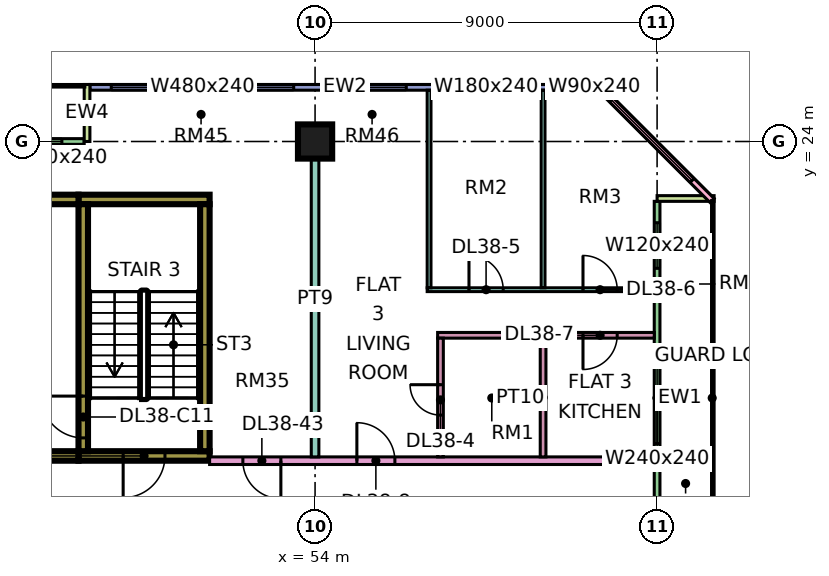
"""IFC4 building model, lengths in metres.
Left out: names, types, materials, properties, quantities, classifications, styles, units other than length and angle.
Written with IfcOpenShell. Run it as: python <this file> out.ifc"""

import sys

from ifc_helpers import new_model, si_unit, direction, frame, frame_2d, origin, origin_2d, place, context, subcontext, project, spatial, rectangle, extrude, element, fill, save


model = new_model("IFC4")
c1 = context("Model", 3, precision=1e-05, world=origin(), true_north=direction((0.0, 1.0)))
c2 = subcontext(c1, "Body", "Model", "MODEL_VIEW")
j1 = project(units=[si_unit("LENGTHUNIT", "METRE"), si_unit("PLANEANGLEUNIT", "RADIAN")], contexts=[c1])
p1 = place(None, origin())
s1 = spatial("IfcSite", under=j1, at=p1, CompositionType="ELEMENT")
p2 = place(p1, origin())
s2 = spatial("IfcBuilding", under=s1, at=p2, CompositionType="ELEMENT")
p3 = place(p2, frame((0.0, 0.0, 168.65)))
s3 = spatial("IfcBuildingStorey", under=s2, at=p3, CompositionType="ELEMENT", Elevation=168.65)
p4 = place(p3, frame((54.0, 24.0, 0.0), z_axis=(0.0, 0.0, 1.0), x_axis=(1.0, 0.0, 0.0)))
e1 = element("IfcColumn", 1, at=p4, inside=s3, PredefinedType="COLUMN", context=c2, shape_type="SweptSolid", body=[
    extrude(rectangle(XDim=0.9, YDim=0.9, at=origin_2d()), origin(), (0.0, 0.0, 1.0), 3.75),
])
p5 = place(p3, frame((47.775, 15.725, 0.0), z_axis=(0.0, 0.0, 1.0), x_axis=(1.0, 0.0, 0.0)))
e2 = element("IfcWall", 2, at=p5, inside=s3, PredefinedType="SHEAR", context=c2, shape_type="SweptSolid", body=[
    extrude(rectangle(XDim=3.45, YDim=0.25, at=frame_2d((1.725, 0.0))), origin(), (0.0, 0.0, 1.0), 3.75),
])
p6 = place(p5, frame((1.175, 0.0, 0.0)))
e3 = element("IfcOpeningElement", 3, at=p6, cuts=e2, PredefinedType="OPENING", context=c2, shape_type="SweptSolid", body=[
    extrude(rectangle(XDim=1.1, YDim=2.2, at=frame_2d((0.55, 1.1))), frame((0.0, 0.135, 0.0), z_axis=(0.0, -1.0, 0.0), x_axis=(1.0, 0.0, 0.0)), (0.0, 0.0, 1.0), 0.27),
])
p7 = place(p3, frame((47.775, 22.475, 0.0), z_axis=(0.0, 0.0, 1.0), x_axis=(1.0, 0.0, 0.0)))
e4 = element("IfcWall", 4, at=p7, inside=s3, PredefinedType="SHEAR", context=c2, shape_type="SweptSolid", body=[
    extrude(rectangle(XDim=3.45, YDim=0.25, at=frame_2d((1.725, 0.0))), origin(), (0.0, 0.0, 1.0), 3.75),
])
p8 = place(p3, frame((47.9, 15.85, 0.0), z_axis=(0.0, 0.0, 1.0), x_axis=(0.0, 1.0, 0.0)))
e5 = element("IfcWall", 5, at=p8, inside=s3, PredefinedType="SHEAR", context=c2, shape_type="SweptSolid", body=[
    extrude(rectangle(XDim=6.5, YDim=0.25, at=frame_2d((3.25, 0.0))), origin(), (0.0, 0.0, 1.0), 3.75),
])
p9 = place(p8, frame((0.35, 0.0, 0.0)))
e6 = element("IfcOpeningElement", 6, at=p9, cuts=e5, PredefinedType="OPENING", context=c2, shape_type="SweptSolid", body=[
    extrude(rectangle(XDim=1.1, YDim=2.2, at=frame_2d((0.55, 1.1))), frame((0.0, 0.135, 0.0), z_axis=(0.0, -1.0, 0.0), x_axis=(1.0, 0.0, 0.0)), (0.0, 0.0, 1.0), 0.27),
])
p10 = place(p3, frame((51.1, 15.85, 0.0), z_axis=(0.0, 0.0, 1.0), x_axis=(0.0, 1.0, 0.0)))
e7 = element("IfcWall", 7, at=p10, inside=s3, PredefinedType="SHEAR", context=c2, shape_type="SweptSolid", body=[
    extrude(rectangle(XDim=6.5, YDim=0.25, at=frame_2d((3.25, 0.0))), origin(), (0.0, 0.0, 1.0), 3.75),
])
p11 = place(p3, frame((44.35, 15.725, 0.0), z_axis=(0.0, 0.0, 1.0), x_axis=(1.0, 0.0, 0.0)))
e8 = element("IfcWall", 8, at=p11, inside=s3, PredefinedType="SHEAR", context=c2, shape_type="SweptSolid", body=[
    extrude(rectangle(XDim=3.425, YDim=0.25, at=frame_2d((1.712, 0.0))), origin(), (0.0, 0.0, 1.0), 3.75),
])
p12 = place(p11, frame((1.25, 0.0, 0.0)))
e9 = element("IfcOpeningElement", 9, at=p12, cuts=e8, PredefinedType="OPENING", context=c2, shape_type="SweptSolid", body=[
    extrude(rectangle(XDim=1.2, YDim=2.2, at=frame_2d((0.6, 1.1))), frame((0.0, 0.135, 0.0), z_axis=(0.0, -1.0, 0.0), x_axis=(1.0, 0.0, 0.0)), (0.0, 0.0, 1.0), 0.27),
])
p13 = place(p3, frame((44.35, 22.475, 0.0), z_axis=(0.0, 0.0, 1.0), x_axis=(1.0, 0.0, 0.0)))
e10 = element("IfcWall", 10, at=p13, inside=s3, PredefinedType="SHEAR", context=c2, shape_type="SweptSolid", body=[
    extrude(rectangle(XDim=3.425, YDim=0.25, at=frame_2d((1.712, 0.0))), origin(), (0.0, 0.0, 1.0), 3.75),
])
p14 = place(p3, frame((61.5, 25.425, 0.0), z_axis=(0.0, 0.0, 1.0), x_axis=(-1.0, 0.0, 0.0)))
e11 = element("IfcWall", 11, at=p14, inside=s3, PredefinedType="SOLIDWALL", context=c2, shape_type="SweptSolid", body=[
    extrude(rectangle(XDim=13.425, YDim=0.15, at=frame_2d((6.712, 0.0))), origin(), (0.0, 0.0, 1.0), 3.35),
])
p15 = place(p14, frame((0.3, 0.0, 0.45)))
e12 = element("IfcOpeningElement", 12, at=p15, cuts=e11, PredefinedType="OPENING", context=c2, shape_type="SweptSolid", body=[
    extrude(rectangle(XDim=0.9, YDim=2.4, at=frame_2d((0.45, 1.2))), frame((0.0, 0.085, 0.0), z_axis=(0.0, -1.0, 0.0), x_axis=(1.0, 0.0, 0.0)), (0.0, 0.0, 1.0), 0.17),
])
p16 = place(p14, frame((2.1, 0.0, 0.45)))
e13 = element("IfcOpeningElement", 13, at=p16, cuts=e11, PredefinedType="OPENING", context=c2, shape_type="SweptSolid", body=[
    extrude(rectangle(XDim=1.8, YDim=2.4, at=frame_2d((0.9, 1.2))), frame((0.0, 0.085, 0.0), z_axis=(0.0, -1.0, 0.0), x_axis=(1.0, 0.0, 0.0)), (0.0, 0.0, 1.0), 0.17),
])
p17 = place(p14, frame((5.1, 0.0, 0.45)))
e14 = element("IfcOpeningElement", 14, at=p17, cuts=e11, PredefinedType="OPENING", context=c2, shape_type="SweptSolid", body=[
    extrude(rectangle(XDim=1.8, YDim=2.4, at=frame_2d((0.9, 1.2))), frame((0.0, 0.085, 0.0), z_axis=(0.0, -1.0, 0.0), x_axis=(1.0, 0.0, 0.0)), (0.0, 0.0, 1.0), 0.17),
])
p18 = place(p14, frame((8.062, 0.0, 0.45)))
e15 = element("IfcOpeningElement", 15, at=p18, cuts=e11, PredefinedType="OPENING", context=c2, shape_type="SweptSolid", body=[
    extrude(rectangle(XDim=4.8, YDim=2.4, at=frame_2d((2.4, 1.2))), frame((0.0, 0.085, 0.0), z_axis=(0.0, -1.0, 0.0), x_axis=(1.0, 0.0, 0.0)), (0.0, 0.0, 1.0), 0.17),
])
p19 = place(p3, frame((47.925, 24.0, 0.0), z_axis=(0.0, 0.0, 1.0), x_axis=(-1.0, 0.0, 0.0)))
e16 = element("IfcWall", 16, at=p19, inside=s3, PredefinedType="SOLIDWALL", context=c2, shape_type="SweptSolid", body=[
    extrude(rectangle(XDim=7.35, YDim=0.15, at=frame_2d((3.675, 0.0))), origin(), (0.0, 0.0, 1.0), 3.35),
])
p20 = place(p19, frame((0.587, 0.0, 0.45)))
e17 = element("IfcOpeningElement", 17, at=p20, cuts=e16, PredefinedType="OPENING", context=c2, shape_type="SweptSolid", body=[
    extrude(rectangle(XDim=1.2, YDim=2.4, at=frame_2d((0.6, 1.2))), frame((0.0, 0.085, 0.0), z_axis=(0.0, -1.0, 0.0), x_axis=(1.0, 0.0, 0.0)), (0.0, 0.0, 1.0), 0.17),
])
p21 = place(p19, frame((3.913, 0.0, 0.45)))
e18 = element("IfcOpeningElement", 18, at=p21, cuts=e16, PredefinedType="OPENING", context=c2, shape_type="SweptSolid", body=[
    extrude(rectangle(XDim=3.0, YDim=2.4, at=frame_2d((1.5, 1.2))), frame((0.0, 0.085, 0.0), z_axis=(0.0, -1.0, 0.0), x_axis=(1.0, 0.0, 0.0)), (0.0, 0.0, 1.0), 0.17),
])
p22 = place(p3, frame((48.0, 25.5, 0.0), z_axis=(0.0, 0.0, 1.0), x_axis=(0.0, -1.0, 0.0)))
e19 = element("IfcWall", 19, at=p22, inside=s3, PredefinedType="SOLIDWALL", context=c2, shape_type="SweptSolid", body=[
    extrude(rectangle(XDim=1.5, YDim=0.15, at=frame_2d((0.75, 0.0))), origin(), (0.0, 0.0, 1.0), 3.35),
])
p23 = place(p3, frame((63.0, 12.075, 0.0), z_axis=(0.0, 0.0, 1.0), x_axis=(0.0, 1.0, 0.0)))
e20 = element("IfcWall", 20, at=p23, inside=s3, PredefinedType="SOLIDWALL", context=c2, shape_type="SweptSolid", body=[
    extrude(rectangle(XDim=10.35, YDim=0.15, at=frame_2d((5.175, 0.0))), origin(), (0.0, 0.0, 1.0), 3.35),
])
p24 = place(p23, frame((3.975, 0.0, 0.45)))
e21 = element("IfcOpeningElement", 21, at=p24, cuts=e20, PredefinedType="OPENING", context=c2, shape_type="SweptSolid", body=[
    extrude(rectangle(XDim=2.4, YDim=2.4, at=frame_2d((1.2, 1.2))), frame((0.0, 0.085, 0.0), z_axis=(0.0, -1.0, 0.0), x_axis=(1.0, 0.0, 0.0)), (0.0, 0.0, 1.0), 0.17),
])
p25 = place(p23, frame((8.587, 0.0, 0.45)))
e22 = element("IfcOpeningElement", 22, at=p25, cuts=e20, PredefinedType="OPENING", context=c2, shape_type="SweptSolid", body=[
    extrude(rectangle(XDim=1.2, YDim=2.4, at=frame_2d((0.6, 1.2))), frame((0.0, 0.085, 0.0), z_axis=(0.0, -1.0, 0.0), x_axis=(1.0, 0.0, 0.0)), (0.0, 0.0, 1.0), 0.17),
])
p26 = place(p3, frame((64.5, 22.5, 0.0), z_axis=(0.0, 0.0, 1.0), x_axis=(-1.0, 0.0, 0.0)))
e23 = element("IfcWall", 23, at=p26, inside=s3, PredefinedType="SOLIDWALL", context=c2, shape_type="SweptSolid", body=[
    extrude(rectangle(XDim=1.5, YDim=0.15, at=frame_2d((0.75, 0.0))), origin(), (0.0, 0.0, 1.0), 3.35),
])
p27 = place(p3, frame((64.447, 22.447, 0.0), z_axis=(0.0, 0.0, 1.0), x_axis=(-0.707106781187, 0.707106781187, 0.0)))
e24 = element("IfcWall", 24, at=p27, inside=s3, PredefinedType="SOLIDWALL", context=c2, shape_type="SweptSolid", body=[
    extrude(rectangle(XDim=4.243, YDim=0.15, at=frame_2d((2.121, 0.0))), origin(), (0.0, 0.0, 1.0), 3.35),
])
p28 = place(p27, frame((0.744, 0.0, 0.45)))
e25 = element("IfcOpeningElement", 25, at=p28, cuts=e24, PredefinedType="OPENING", context=c2, shape_type="SweptSolid", body=[
    extrude(rectangle(XDim=3.0, YDim=2.4, at=frame_2d((1.5, 1.2))), frame((0.0, 0.085, 0.0), z_axis=(0.0, -1.0, 0.0), x_axis=(1.0, 0.0, 0.0)), (0.0, 0.0, 1.0), 0.17),
])
p29 = place(p3, frame((51.225, 15.6, 0.0), z_axis=(0.0, 0.0, 1.0), x_axis=(1.0, 0.0, 0.0)))
e26 = element("IfcWall", 26, at=p29, inside=s3, PredefinedType="PARTITIONING", context=c2, shape_type="SweptSolid", body=[
    extrude(rectangle(XDim=11.701, YDim=0.2, at=frame_2d((5.851, 0.0))), origin(), (0.0, 0.0, 1.0), 3.35),
])
p30 = place(p29, frame((3.875, 0.0, 0.0)))
e27 = element("IfcOpeningElement", 27, at=p30, cuts=e26, PredefinedType="OPENING", context=c2, shape_type="SweptSolid", body=[
    extrude(rectangle(XDim=1.0, YDim=2.1, at=frame_2d((0.5, 1.05))), frame((0.0, 0.11, 0.0), z_axis=(0.0, -1.0, 0.0), x_axis=(1.0, 0.0, 0.0)), (0.0, 0.0, 1.0), 0.22),
])
p31 = place(p29, frame((0.875, 0.0, 0.0)))
e28 = element("IfcOpeningElement", 28, at=p31, cuts=e26, PredefinedType="OPENING", context=c2, shape_type="SweptSolid", body=[
    extrude(rectangle(XDim=1.0, YDim=2.1, at=frame_2d((0.5, 1.05))), frame((0.0, 0.11, 0.0), z_axis=(0.0, -1.0, 0.0), x_axis=(1.0, 0.0, 0.0)), (0.0, 0.0, 1.0), 0.22),
])
p32 = place(p3, frame((54.0, 15.7, 0.0), z_axis=(0.0, 0.0, 1.0), x_axis=(0.0, 1.0, 0.0)))
e29 = element("IfcWall", 29, at=p32, inside=s3, PredefinedType="PARTITIONING", context=c2, shape_type="SweptSolid", body=[
    extrude(rectangle(XDim=8.3, YDim=0.2, at=frame_2d((4.15, 0.0))), origin(), (0.0, 0.0, 1.0), 3.35),
])
p33 = place(p3, frame((56.95, 20.1, 0.0), z_axis=(0.0, 0.0, 1.0), x_axis=(1.0, 0.0, 0.0)))
e30 = element("IfcWall", 30, at=p33, inside=s3, PredefinedType="PARTITIONING", context=c2, shape_type="SweptSolid", body=[
    extrude(rectangle(XDim=5.976, YDim=0.1, at=frame_2d((2.988, 0.0))), origin(), (0.0, 0.0, 1.0), 3.35),
])
p34 = place(p33, frame((1.1, 0.0, 0.0)))
e31 = element("IfcOpeningElement", 31, at=p34, cuts=e30, PredefinedType="OPENING", context=c2, shape_type="SweptSolid", body=[
    extrude(rectangle(XDim=0.9, YDim=2.1, at=frame_2d((0.45, 1.05))), frame((0.0, 0.06, 0.0), z_axis=(0.0, -1.0, 0.0), x_axis=(1.0, 0.0, 0.0)), (0.0, 0.0, 1.0), 0.12),
])
p35 = place(p33, frame((4.1, 0.0, 0.0)))
e32 = element("IfcOpeningElement", 32, at=p35, cuts=e30, PredefinedType="OPENING", context=c2, shape_type="SweptSolid", body=[
    extrude(rectangle(XDim=0.9, YDim=2.1, at=frame_2d((0.45, 1.05))), frame((0.0, 0.06, 0.0), z_axis=(0.0, -1.0, 0.0), x_axis=(1.0, 0.0, 0.0)), (0.0, 0.0, 1.0), 0.12),
])
p36 = place(p3, frame((57.0, 20.15, 0.0), z_axis=(0.0, 0.0, 1.0), x_axis=(0.0, 1.0, 0.0)))
e33 = element("IfcWall", 33, at=p36, inside=s3, PredefinedType="PARTITIONING", context=c2, shape_type="SweptSolid", body=[
    extrude(rectangle(XDim=5.2, YDim=0.1, at=frame_2d((2.6, 0.0))), origin(), (0.0, 0.0, 1.0), 3.35),
])
p37 = place(p3, frame((57.225, 18.9, 0.0), z_axis=(0.0, 0.0, 1.0), x_axis=(1.0, 0.0, 0.0)))
e34 = element("IfcWall", 34, at=p37, inside=s3, PredefinedType="PARTITIONING", context=c2, shape_type="SweptSolid", body=[
    extrude(rectangle(XDim=5.701, YDim=0.15, at=frame_2d((2.851, 0.0))), origin(), (0.0, 0.0, 1.0), 3.35),
])
p38 = place(p37, frame((3.825, 0.0, 0.0)))
e35 = element("IfcOpeningElement", 35, at=p38, cuts=e34, PredefinedType="OPENING", context=c2, shape_type="SweptSolid", body=[
    extrude(rectangle(XDim=0.9, YDim=2.1, at=frame_2d((0.45, 1.05))), frame((0.0, 0.085, 0.0), z_axis=(0.0, -1.0, 0.0), x_axis=(1.0, 0.0, 0.0)), (0.0, 0.0, 1.0), 0.17),
])
p39 = place(p3, frame((57.3, 15.7, 0.0), z_axis=(0.0, 0.0, 1.0), x_axis=(0.0, 1.0, 0.0)))
e36 = element("IfcWall", 36, at=p39, inside=s3, PredefinedType="PARTITIONING", context=c2, shape_type="SweptSolid", body=[
    extrude(rectangle(XDim=3.125, YDim=0.15, at=frame_2d((1.562, 0.0))), origin(), (0.0, 0.0, 1.0), 3.35),
])
p40 = place(p39, frame((1.1, 0.0, 0.0)))
e37 = element("IfcOpeningElement", 37, at=p40, cuts=e36, PredefinedType="OPENING", context=c2, shape_type="SweptSolid", body=[
    extrude(rectangle(XDim=0.8, YDim=2.1, at=frame_2d((0.4, 1.05))), frame((0.0, 0.085, 0.0), z_axis=(0.0, -1.0, 0.0), x_axis=(1.0, 0.0, 0.0)), (0.0, 0.0, 1.0), 0.17),
])
p41 = place(p3, frame((60.0, 15.7, 0.0), z_axis=(0.0, 0.0, 1.0), x_axis=(0.0, 1.0, 0.0)))
e38 = element("IfcWall", 38, at=p41, inside=s3, PredefinedType="PARTITIONING", context=c2, shape_type="SweptSolid", body=[
    extrude(rectangle(XDim=3.125, YDim=0.15, at=frame_2d((1.562, 0.0))), origin(), (0.0, 0.0, 1.0), 3.35),
])
p42 = place(p3, frame((60.0, 20.15, 0.0), z_axis=(0.0, 0.0, 1.0), x_axis=(0.0, 1.0, 0.0)))
e39 = element("IfcWall", 39, at=p42, inside=s3, PredefinedType="PARTITIONING", context=c2, shape_type="SweptSolid", body=[
    extrude(rectangle(XDim=5.201, YDim=0.1, at=frame_2d((2.601, 0.0))), origin(), (0.0, 0.0, 1.0), 3.35),
])
p43 = place(p15, origin())
e40 = element("IfcWindow", 40, at=p43, inside=s3, PartitioningType="SINGLE_PANEL", PredefinedType="WINDOW", context=c2, shape_type="SweptSolid", body=[
    extrude(rectangle(XDim=0.9, YDim=2.4, at=frame_2d((0.45, 1.2))), frame((0.0, 0.03, 0.0), z_axis=(0.0, -1.0, 0.0), x_axis=(1.0, 0.0, 0.0)), (0.0, 0.0, 1.0), 0.06),
])
fill(e12, e40)
p44 = place(p16, origin())
e41 = element("IfcWindow", 41, at=p44, inside=s3, PartitioningType="SINGLE_PANEL", PredefinedType="WINDOW", context=c2, shape_type="SweptSolid", body=[
    extrude(rectangle(XDim=1.8, YDim=2.4, at=frame_2d((0.9, 1.2))), frame((0.0, 0.03, 0.0), z_axis=(0.0, -1.0, 0.0), x_axis=(1.0, 0.0, 0.0)), (0.0, 0.0, 1.0), 0.06),
])
fill(e13, e41)
p45 = place(p17, origin())
e42 = element("IfcWindow", 42, at=p45, inside=s3, PartitioningType="SINGLE_PANEL", PredefinedType="WINDOW", context=c2, shape_type="SweptSolid", body=[
    extrude(rectangle(XDim=1.8, YDim=2.4, at=frame_2d((0.9, 1.2))), frame((0.0, 0.03, 0.0), z_axis=(0.0, -1.0, 0.0), x_axis=(1.0, 0.0, 0.0)), (0.0, 0.0, 1.0), 0.06),
])
fill(e14, e42)
p46 = place(p18, origin())
e43 = element("IfcWindow", 43, at=p46, inside=s3, PartitioningType="SINGLE_PANEL", PredefinedType="WINDOW", context=c2, shape_type="SweptSolid", body=[
    extrude(rectangle(XDim=4.8, YDim=2.4, at=frame_2d((2.4, 1.2))), frame((0.0, 0.03, 0.0), z_axis=(0.0, -1.0, 0.0), x_axis=(1.0, 0.0, 0.0)), (0.0, 0.0, 1.0), 0.06),
])
fill(e15, e43)
p47 = place(p20, origin())
e44 = element("IfcWindow", 44, at=p47, inside=s3, PartitioningType="SINGLE_PANEL", PredefinedType="WINDOW", context=c2, shape_type="SweptSolid", body=[
    extrude(rectangle(XDim=1.2, YDim=2.4, at=frame_2d((0.6, 1.2))), frame((0.0, 0.03, 0.0), z_axis=(0.0, -1.0, 0.0), x_axis=(1.0, 0.0, 0.0)), (0.0, 0.0, 1.0), 0.06),
])
fill(e17, e44)
p48 = place(p24, origin())
e45 = element("IfcWindow", 45, at=p48, inside=s3, PartitioningType="SINGLE_PANEL", PredefinedType="WINDOW", context=c2, shape_type="SweptSolid", body=[
    extrude(rectangle(XDim=2.4, YDim=2.4, at=frame_2d((1.2, 1.2))), frame((0.0, 0.03, 0.0), z_axis=(0.0, -1.0, 0.0), x_axis=(1.0, 0.0, 0.0)), (0.0, 0.0, 1.0), 0.06),
])
fill(e21, e45)
p49 = place(p25, origin())
e46 = element("IfcWindow", 46, at=p49, inside=s3, PartitioningType="SINGLE_PANEL", PredefinedType="WINDOW", context=c2, shape_type="SweptSolid", body=[
    extrude(rectangle(XDim=1.2, YDim=2.4, at=frame_2d((0.6, 1.2))), frame((0.0, 0.03, 0.0), z_axis=(0.0, -1.0, 0.0), x_axis=(1.0, 0.0, 0.0)), (0.0, 0.0, 1.0), 0.06),
])
fill(e22, e46)
p50 = place(p28, origin())
e47 = element("IfcWindow", 47, at=p50, inside=s3, PartitioningType="SINGLE_PANEL", PredefinedType="WINDOW", context=c2, shape_type="SweptSolid", body=[
    extrude(rectangle(XDim=3.0, YDim=2.4, at=frame_2d((1.5, 1.2))), frame((0.0, 0.03, 0.0), z_axis=(0.0, -1.0, 0.0), x_axis=(1.0, 0.0, 0.0)), (0.0, 0.0, 1.0), 0.06),
])
fill(e25, e47)
p51 = place(p6, frame((1.1, 0.0, 0.0), z_axis=(0.0, 0.0, 1.0), x_axis=(-1.0, 0.0, 0.0)))
e48 = element("IfcDoor", 48, at=p51, inside=s3, OperationType="SINGLE_SWING_LEFT", PredefinedType="DOOR", context=c2, shape_type="SweptSolid", body=[
    extrude(rectangle(XDim=1.1, YDim=2.2, at=frame_2d((0.55, 1.1))), frame((0.0, 0.025, 0.0), z_axis=(0.0, -1.0, 0.0), x_axis=(1.0, 0.0, 0.0)), (0.0, 0.0, 1.0), 0.05),
])
fill(e3, e48)
p52 = place(p9, frame((1.1, 0.0, 0.0), z_axis=(0.0, 0.0, 1.0), x_axis=(-1.0, 0.0, 0.0)))
e49 = element("IfcDoor", 49, at=p52, inside=s3, OperationType="SINGLE_SWING_RIGHT", PredefinedType="DOOR", context=c2, shape_type="SweptSolid", body=[
    extrude(rectangle(XDim=1.1, YDim=2.2, at=frame_2d((0.55, 1.1))), frame((0.0, 0.025, 0.0), z_axis=(0.0, -1.0, 0.0), x_axis=(1.0, 0.0, 0.0)), (0.0, 0.0, 1.0), 0.05),
])
fill(e6, e49)
p53 = place(p40, frame((0.8, 0.0, 0.0), z_axis=(0.0, 0.0, 1.0), x_axis=(-1.0, 0.0, 0.0)))
e50 = element("IfcDoor", 50, at=p53, inside=s3, OperationType="SINGLE_SWING_RIGHT", PredefinedType="DOOR", context=c2, shape_type="SweptSolid", body=[
    extrude(rectangle(XDim=0.8, YDim=2.1, at=frame_2d((0.4, 1.05))), frame((0.0, 0.025, 0.0), z_axis=(0.0, -1.0, 0.0), x_axis=(1.0, 0.0, 0.0)), (0.0, 0.0, 1.0), 0.05),
])
fill(e37, e50)
p54 = place(p34, origin())
e51 = element("IfcDoor", 51, at=p54, inside=s3, OperationType="SINGLE_SWING_LEFT", PredefinedType="DOOR", context=c2, shape_type="SweptSolid", body=[
    extrude(rectangle(XDim=0.9, YDim=2.1, at=frame_2d((0.45, 1.05))), frame((0.0, 0.025, 0.0), z_axis=(0.0, -1.0, 0.0), x_axis=(1.0, 0.0, 0.0)), (0.0, 0.0, 1.0), 0.05),
])
fill(e31, e51)
p55 = place(p35, origin())
e52 = element("IfcDoor", 52, at=p55, inside=s3, OperationType="SINGLE_SWING_LEFT", PredefinedType="DOOR", context=c2, shape_type="SweptSolid", body=[
    extrude(rectangle(XDim=0.9, YDim=2.1, at=frame_2d((0.45, 1.05))), frame((0.0, 0.025, 0.0), z_axis=(0.0, -1.0, 0.0), x_axis=(1.0, 0.0, 0.0)), (0.0, 0.0, 1.0), 0.05),
])
fill(e32, e52)
p56 = place(p38, frame((0.9, 0.0, 0.0), z_axis=(0.0, 0.0, 1.0), x_axis=(-1.0, 0.0, 0.0)))
e53 = element("IfcDoor", 53, at=p56, inside=s3, OperationType="SINGLE_SWING_LEFT", PredefinedType="DOOR", context=c2, shape_type="SweptSolid", body=[
    extrude(rectangle(XDim=0.9, YDim=2.1, at=frame_2d((0.45, 1.05))), frame((0.0, 0.025, 0.0), z_axis=(0.0, -1.0, 0.0), x_axis=(1.0, 0.0, 0.0)), (0.0, 0.0, 1.0), 0.05),
])
fill(e35, e53)
p57 = place(p30, origin())
e54 = element("IfcDoor", 54, at=p57, inside=s3, OperationType="SINGLE_SWING_LEFT", PredefinedType="DOOR", context=c2, shape_type="SweptSolid", body=[
    extrude(rectangle(XDim=1.0, YDim=2.1, at=frame_2d((0.5, 1.05))), frame((0.0, 0.025, 0.0), z_axis=(0.0, -1.0, 0.0), x_axis=(1.0, 0.0, 0.0)), (0.0, 0.0, 1.0), 0.05),
])
fill(e27, e54)
p58 = place(p31, origin())
e55 = element("IfcDoor", 55, at=p58, inside=s3, OperationType="SINGLE_SWING_RIGHT", PredefinedType="DOOR", context=c2, shape_type="SweptSolid", body=[
    extrude(rectangle(XDim=1.0, YDim=2.1, at=frame_2d((0.5, 1.05))), frame((0.0, 0.025, 0.0), z_axis=(0.0, -1.0, 0.0), x_axis=(1.0, 0.0, 0.0)), (0.0, 0.0, 1.0), 0.05),
])
fill(e28, e55)
save(model, sys.argv[1])
